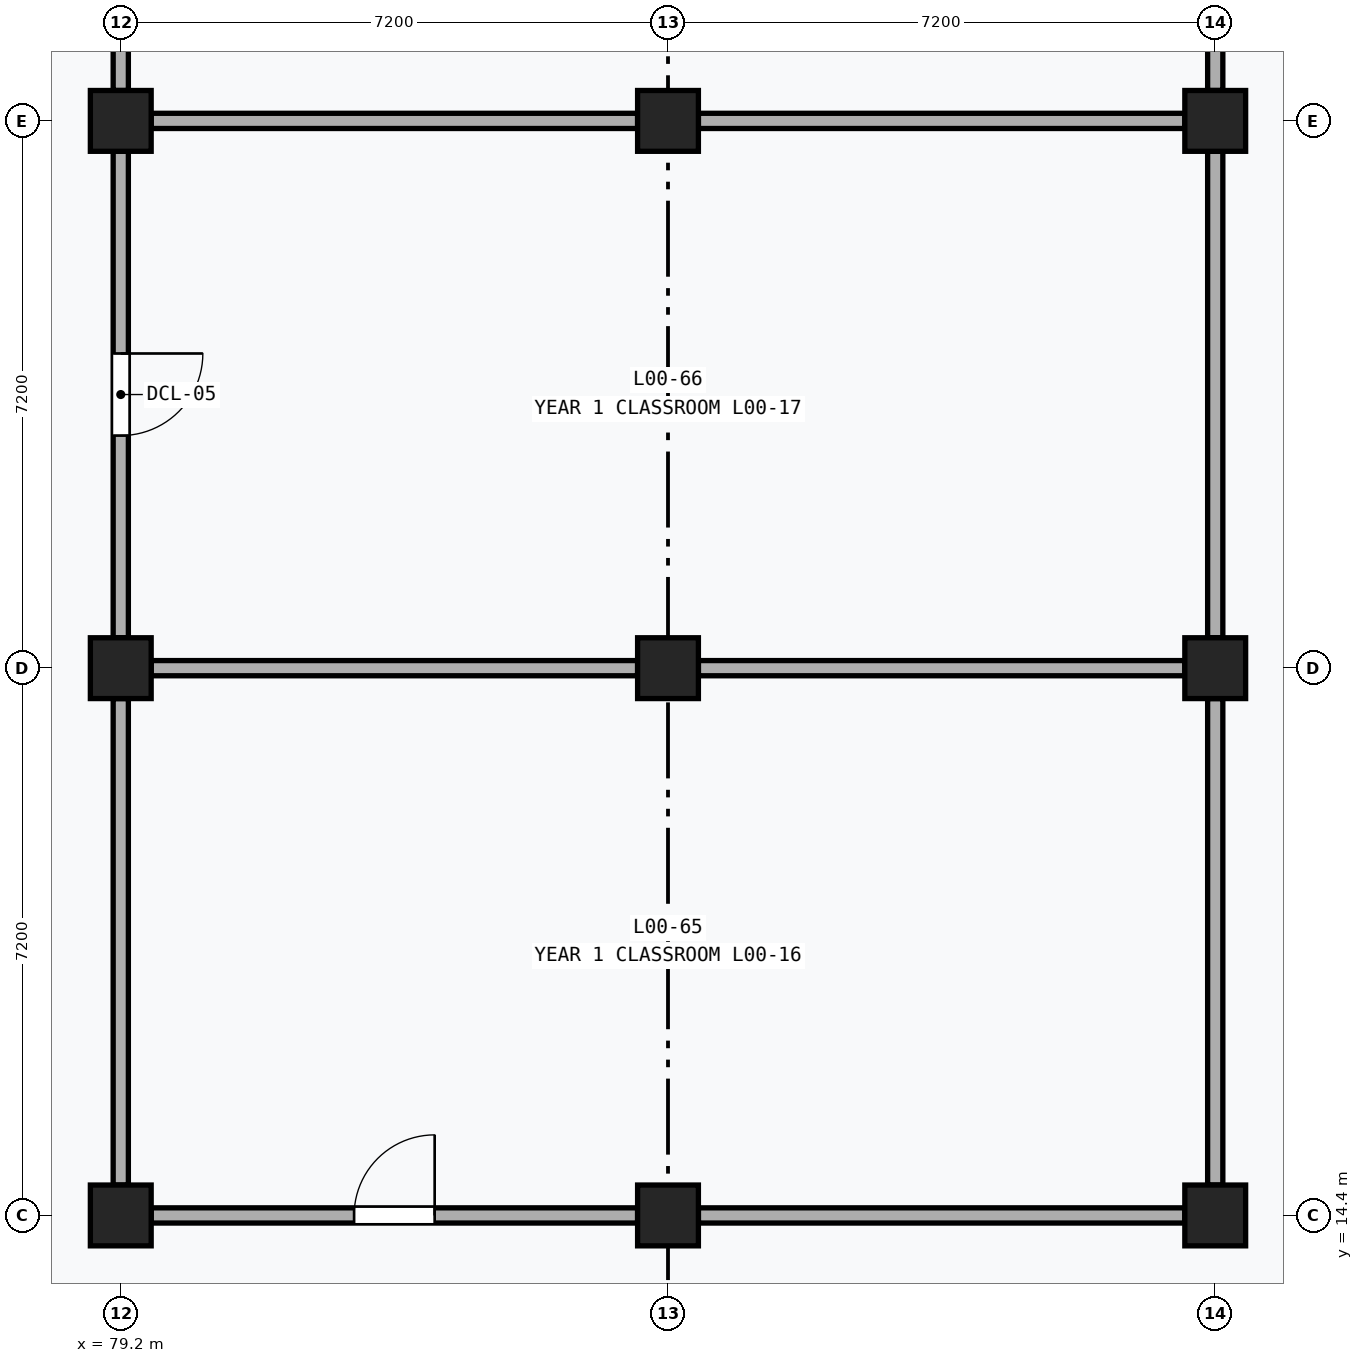
"""IFC4 building model, lengths in metres.
Left out: names, types, materials, properties, quantities, classifications, styles, units other than length and angle.
Written with IfcOpenShell. Run it as: python <this file> out.ifc"""

import sys

from ifc_helpers import new_model, si_unit, direction, frame, frame_2d, origin, origin_2d, place, context, subcontext, project, spatial, rectangle, extrude, element, fill, save


model = new_model("IFC4")
c1 = context("Model", 3, precision=1e-05, world=origin(), true_north=direction((0.0, 1.0)))
c2 = subcontext(c1, "Body", "Model", "MODEL_VIEW")
j1 = project(units=[si_unit("LENGTHUNIT", "METRE"), si_unit("PLANEANGLEUNIT", "RADIAN")], contexts=[c1])
p1 = place(None, origin())
s1 = spatial("IfcSite", under=j1, at=p1, CompositionType="ELEMENT")
p2 = place(p1, origin())
s2 = spatial("IfcBuilding", under=s1, at=p2, CompositionType="ELEMENT")
p3 = place(p2, origin())
s3 = spatial("IfcBuildingStorey", under=s2, at=p3, CompositionType="ELEMENT", Elevation=0.0)
for number, where, z_axis, x_axis in (
    (1, (79.2, 14.4, 0.0), (0.0, 0.0, 1.0), (1.0, 0.0, 0.0)),
    (2, (79.2, 21.6, 0.0), (0.0, 0.0, 1.0), (1.0, 0.0, 0.0)),
    (3, (79.2, 28.8, 0.0), (0.0, 0.0, 1.0), (1.0, 0.0, 0.0)),
    (4, (86.4, 14.4, 0.0), (0.0, 0.0, 1.0), (1.0, 0.0, 0.0)),
    (5, (86.4, 21.6, 0.0), (0.0, 0.0, 1.0), (1.0, 0.0, 0.0)),
    (6, (86.4, 28.8, 0.0), (0.0, 0.0, 1.0), (1.0, 0.0, 0.0)),
    (7, (93.6, 14.4, 0.0), (0.0, 0.0, 1.0), (1.0, 0.0, 0.0)),
    (8, (93.6, 21.6, 0.0), (0.0, 0.0, 1.0), (1.0, 0.0, 0.0)),
    (9, (93.6, 28.8, 0.0), (0.0, 0.0, 1.0), (1.0, 0.0, 0.0)),
):
    element("IfcColumn", number, at=place(p3, frame(where, z_axis=z_axis, x_axis=x_axis)), inside=s3, PredefinedType="COLUMN", context=c2, shape_type="SweptSolid", body=[
        extrude(rectangle(XDim=0.8, YDim=0.8, at=origin_2d()), origin(), (0.0, 0.0, 1.0), 4.8),
    ])
p4 = place(p3, frame((79.6, 28.8, 0.0), z_axis=(0.0, 0.0, 1.0), x_axis=(1.0, 0.0, 0.0)))
e10 = element("IfcWall", 10, at=p4, inside=s3, PredefinedType="PARTITIONING", context=c2, shape_type="SweptSolid", body=[
    extrude(rectangle(XDim=6.4, YDim=0.2, at=frame_2d((3.2, 0.0))), origin(), (0.0, 0.0, 1.0), 3.62),
])
p5 = place(p3, frame((79.2, 29.2, 0.0), z_axis=(0.0, 0.0, 1.0), x_axis=(0.0, 1.0, 0.0)))
e11 = element("IfcWall", 11, at=p5, inside=s3, PredefinedType="PARTITIONING", context=c2, shape_type="SweptSolid", body=[
    extrude(rectangle(XDim=6.4, YDim=0.2, at=frame_2d((3.2, 0.0))), origin(), (0.0, 0.0, 1.0), 3.62),
])
p6 = place(p5, frame((2.67, 0.0, 0.0)))
e12 = element("IfcOpeningElement", 12, at=p6, cuts=e11, PredefinedType="OPENING", context=c2, shape_type="SweptSolid", body=[
    extrude(rectangle(XDim=1.06, YDim=2.16, at=frame_2d((0.53, 1.08))), frame((0.0, 0.112, 0.0), z_axis=(0.0, -1.0, 0.0), x_axis=(1.0, 0.0, 0.0)), (0.0, 0.0, 1.0), 0.224),
])
p7 = place(p3, frame((86.8, 28.8, 0.0), z_axis=(0.0, 0.0, 1.0), x_axis=(1.0, 0.0, 0.0)))
e13 = element("IfcWall", 13, at=p7, inside=s3, PredefinedType="PARTITIONING", context=c2, shape_type="SweptSolid", body=[
    extrude(rectangle(XDim=6.4, YDim=0.2, at=frame_2d((3.2, 0.0))), origin(), (0.0, 0.0, 1.0), 3.62),
])
p8 = place(p3, frame((93.6, 29.2, 0.0), z_axis=(0.0, 0.0, 1.0), x_axis=(0.0, 1.0, 0.0)))
e14 = element("IfcWall", 14, at=p8, inside=s3, PredefinedType="PARTITIONING", context=c2, shape_type="SweptSolid", body=[
    extrude(rectangle(XDim=6.4, YDim=0.2, at=frame_2d((3.2, 0.0))), origin(), (0.0, 0.0, 1.0), 3.62),
])
p9 = place(p3, frame((79.6, 14.4, 0.0), z_axis=(0.0, 0.0, 1.0), x_axis=(1.0, 0.0, 0.0)))
e15 = element("IfcWall", 15, at=p9, inside=s3, PredefinedType="PARTITIONING", context=c2, shape_type="SweptSolid", body=[
    extrude(rectangle(XDim=6.4, YDim=0.2, at=frame_2d((3.2, 0.0))), origin(), (0.0, 0.0, 1.0), 3.62),
])
p10 = place(p9, frame((2.67, 0.0, 0.0)))
e16 = element("IfcOpeningElement", 16, at=p10, cuts=e15, PredefinedType="OPENING", context=c2, shape_type="SweptSolid", body=[
    extrude(rectangle(XDim=1.06, YDim=2.16, at=frame_2d((0.53, 1.08))), frame((0.0, 0.112, 0.0), z_axis=(0.0, -1.0, 0.0), x_axis=(1.0, 0.0, 0.0)), (0.0, 0.0, 1.0), 0.224),
])
for number, where, z_axis, x_axis in (
    (17, (79.6, 21.6, 0.0), (0.0, 0.0, 1.0), (1.0, 0.0, 0.0)),
    (18, (79.2, 14.8, 0.0), (0.0, 0.0, 1.0), (0.0, 1.0, 0.0)),
    (19, (86.8, 14.4, 0.0), (0.0, 0.0, 1.0), (1.0, 0.0, 0.0)),
    (20, (86.8, 21.6, 0.0), (0.0, 0.0, 1.0), (1.0, 0.0, 0.0)),
    (21, (93.6, 14.8, 0.0), (0.0, 0.0, 1.0), (0.0, 1.0, 0.0)),
):
    element("IfcWall", number, at=place(p3, frame(where, z_axis=z_axis, x_axis=x_axis)), inside=s3, PredefinedType="PARTITIONING", context=c2, shape_type="SweptSolid", body=[
        extrude(rectangle(XDim=6.4, YDim=0.2, at=frame_2d((3.2, 0.0))), origin(), (0.0, 0.0, 1.0), 3.62),
    ])
p11 = place(p3, frame((79.2, 22.0, 0.0), z_axis=(0.0, 0.0, 1.0), x_axis=(0.0, 1.0, 0.0)))
e22 = element("IfcWall", 22, at=p11, inside=s3, PredefinedType="PARTITIONING", context=c2, shape_type="SweptSolid", body=[
    extrude(rectangle(XDim=6.4, YDim=0.2, at=frame_2d((3.2, 0.0))), origin(), (0.0, 0.0, 1.0), 3.62),
])
p12 = place(p11, frame((2.66, 0.0, 0.0)))
e23 = element("IfcOpeningElement", 23, at=p12, cuts=e22, PredefinedType="OPENING", context=c2, shape_type="SweptSolid", body=[
    extrude(rectangle(XDim=1.08, YDim=2.18, at=frame_2d((0.54, 1.09))), frame((0.0, 0.112, 0.0), z_axis=(0.0, -1.0, 0.0), x_axis=(1.0, 0.0, 0.0)), (0.0, 0.0, 1.0), 0.224),
])
p13 = place(p3, frame((93.6, 22.0, 0.0), z_axis=(0.0, 0.0, 1.0), x_axis=(0.0, 1.0, 0.0)))
e24 = element("IfcWall", 24, at=p13, inside=s3, PredefinedType="PARTITIONING", context=c2, shape_type="SweptSolid", body=[
    extrude(rectangle(XDim=6.4, YDim=0.2, at=frame_2d((3.2, 0.0))), origin(), (0.0, 0.0, 1.0), 3.62),
])
p14 = place(p10, origin())
e25 = element("IfcDoor", 25, at=p14, inside=s3, OperationType="SINGLE_SWING_RIGHT", PredefinedType="DOOR", context=c2, shape_type="SweptSolid", body=[
    extrude(rectangle(XDim=1.06, YDim=2.16, at=frame_2d((0.53, 1.08))), frame((0.0, 0.025, 0.0), z_axis=(0.0, -1.0, 0.0), x_axis=(1.0, 0.0, 0.0)), (0.0, 0.0, 1.0), 0.05),
])
fill(e16, e25)
p15 = place(p12, frame((1.08, 0.0, 0.0), z_axis=(0.0, 0.0, 1.0), x_axis=(-1.0, 0.0, 0.0)))
e26 = element("IfcDoor", 26, at=p15, inside=s3, OperationType="SINGLE_SWING_LEFT", PredefinedType="DOOR", context=c2, shape_type="SweptSolid", body=[
    extrude(rectangle(XDim=1.08, YDim=2.18, at=frame_2d((0.54, 1.09))), frame((0.0, 0.025, 0.0), z_axis=(0.0, -1.0, 0.0), x_axis=(1.0, 0.0, 0.0)), (0.0, 0.0, 1.0), 0.05),
])
fill(e23, e26)
save(model, sys.argv[1])
